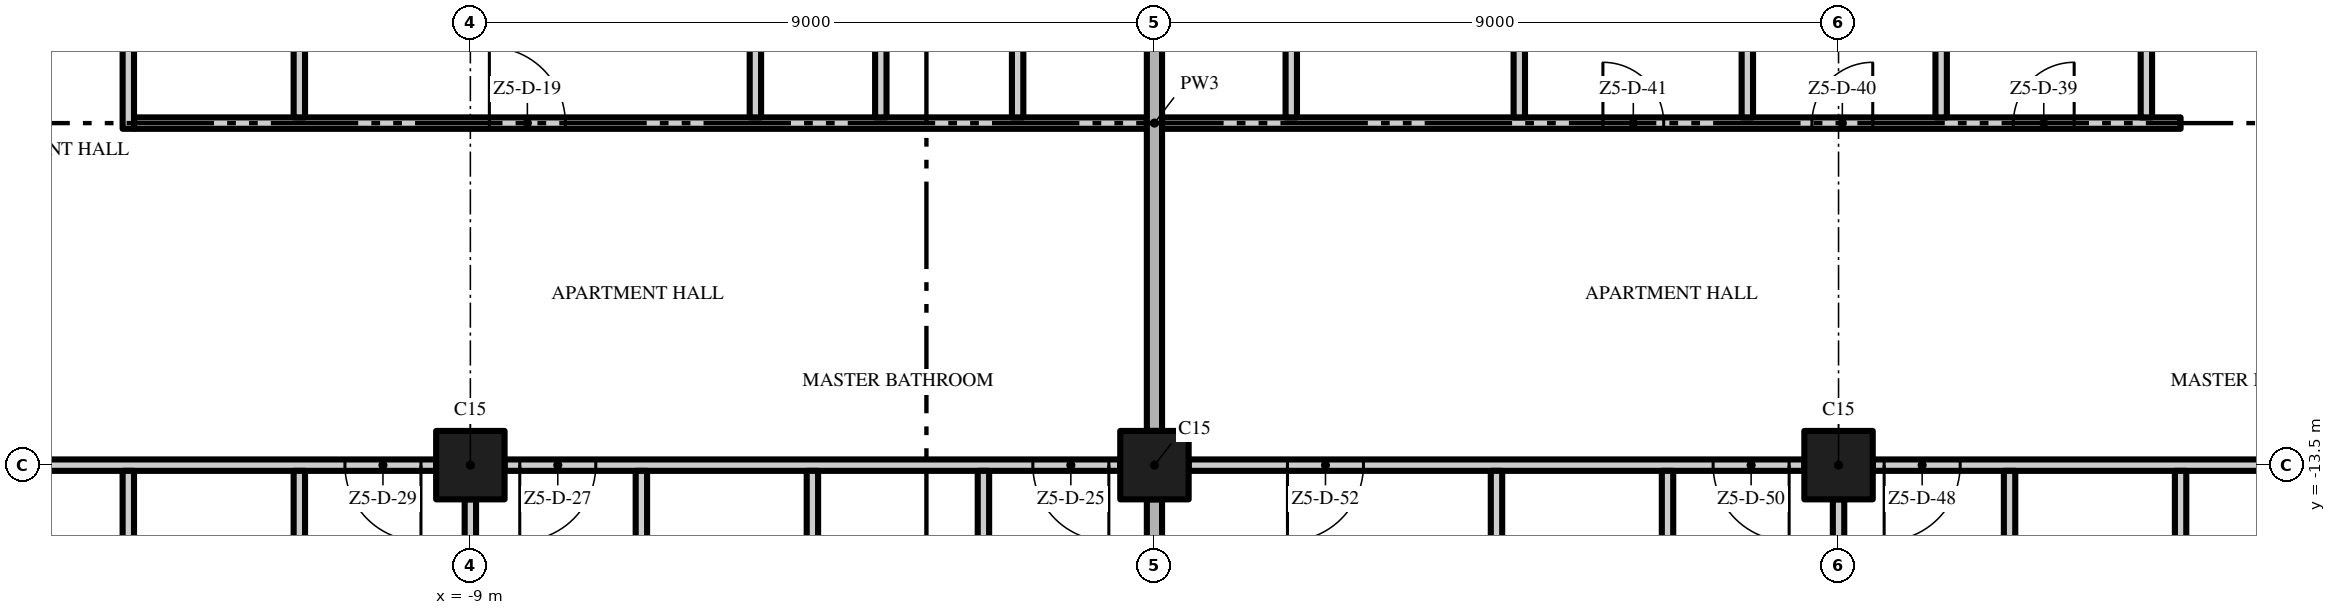
"""IFC4 building model, lengths in metres.
Left out: names, types, materials, properties, quantities, classifications, styles, units other than length and angle.
Written with IfcOpenShell. Run it as: python <this file> out.ifc"""

import sys

from ifc_helpers import new_model, si_unit, direction, frame, frame_2d, origin, origin_2d, place, context, subcontext, project, spatial, rectangle, extrude, element, fill, save


model = new_model("IFC4")
c1 = context("Model", 3, precision=1e-05, world=origin(), true_north=direction((0.0, 1.0)))
c2 = subcontext(c1, "Body", "Model", "MODEL_VIEW")
j1 = project(units=[si_unit("LENGTHUNIT", "METRE"), si_unit("PLANEANGLEUNIT", "RADIAN")], contexts=[c1])
p1 = place(None, origin())
s1 = spatial("IfcSite", under=j1, at=p1, CompositionType="ELEMENT")
p2 = place(p1, origin())
s2 = spatial("IfcBuilding", under=s1, at=p2, CompositionType="ELEMENT")
p3 = place(p2, frame((0.0, 0.0, 276.8)))
s3 = spatial("IfcBuildingStorey", under=s2, at=p3, CompositionType="ELEMENT", Elevation=276.8)
for number, where, z_axis, x_axis in (
    (1, (-9.0, -13.5, 0.0), (0.0, 0.0, 1.0), (1.0, 0.0, 0.0)),
    (2, (0.0, -13.5, 0.0), (0.0, 0.0, 1.0), (1.0, 0.0, 0.0)),
    (3, (9.0, -13.5, 0.0), (0.0, 0.0, 1.0), (1.0, 0.0, 0.0)),
):
    element("IfcColumn", number, at=place(p3, frame(where, z_axis=z_axis, x_axis=x_axis)), inside=s3, PredefinedType="COLUMN", context=c2, shape_type="SweptSolid", body=[
        extrude(rectangle(XDim=0.9, YDim=0.9, at=origin_2d()), origin(), (0.0, 0.0, 1.0), 3.5),
    ])
p4 = place(p3, frame((-9.45, -13.5, 0.0), z_axis=(0.0, 0.0, 1.0), x_axis=(-1.0, 0.0, 0.0)))
e4 = element("IfcWall", 4, at=p4, inside=s3, PredefinedType="PARTITIONING", context=c2, shape_type="SweptSolid", body=[
    extrude(rectangle(XDim=8.1, YDim=0.15, at=frame_2d((4.05, 0.0))), origin(), (0.0, 0.0, 1.0), 3.5),
])
p5 = place(p4, frame((0.2, 0.0, 0.0)))
e5 = element("IfcOpeningElement", 5, at=p5, cuts=e4, PredefinedType="OPENING", context=c2, shape_type="SweptSolid", body=[
    extrude(rectangle(XDim=1.0, YDim=2.4, at=frame_2d((0.5, 1.2))), frame((0.0, 0.085, 0.0), z_axis=(0.0, -1.0, 0.0), x_axis=(1.0, 0.0, 0.0)), (0.0, 0.0, 1.0), 0.17),
])
p6 = place(p4, frame((5.8, 0.0, 0.0)))
e6 = element("IfcOpeningElement", 6, at=p6, cuts=e4, PredefinedType="OPENING", context=c2, shape_type="SweptSolid", body=[
    extrude(rectangle(XDim=1.0, YDim=2.4, at=frame_2d((0.5, 1.2))), frame((0.0, 0.085, 0.0), z_axis=(0.0, -1.0, 0.0), x_axis=(1.0, 0.0, 0.0)), (0.0, 0.0, 1.0), 0.17),
])
p7 = place(p3, frame((-0.45, -13.5, 0.0), z_axis=(0.0, 0.0, 1.0), x_axis=(-1.0, 0.0, 0.0)))
e7 = element("IfcWall", 7, at=p7, inside=s3, PredefinedType="PARTITIONING", context=c2, shape_type="SweptSolid", body=[
    extrude(rectangle(XDim=8.1, YDim=0.15, at=frame_2d((4.05, 0.0))), origin(), (0.0, 0.0, 1.0), 3.5),
])
p8 = place(p7, frame((0.15, 0.0, 0.0)))
e8 = element("IfcOpeningElement", 8, at=p8, cuts=e7, PredefinedType="OPENING", context=c2, shape_type="SweptSolid", body=[
    extrude(rectangle(XDim=1.0, YDim=2.4, at=frame_2d((0.5, 1.2))), frame((0.0, 0.085, 0.0), z_axis=(0.0, -1.0, 0.0), x_axis=(1.0, 0.0, 0.0)), (0.0, 0.0, 1.0), 0.17),
])
p9 = place(p7, frame((6.9, 0.0, 0.0)))
e9 = element("IfcOpeningElement", 9, at=p9, cuts=e7, PredefinedType="OPENING", context=c2, shape_type="SweptSolid", body=[
    extrude(rectangle(XDim=1.0, YDim=2.4, at=frame_2d((0.5, 1.2))), frame((0.0, 0.085, 0.0), z_axis=(0.0, -1.0, 0.0), x_axis=(1.0, 0.0, 0.0)), (0.0, 0.0, 1.0), 0.17),
])
p10 = place(p3, frame((8.55, -13.5, 0.0), z_axis=(0.0, 0.0, 1.0), x_axis=(-1.0, 0.0, 0.0)))
e10 = element("IfcWall", 10, at=p10, inside=s3, PredefinedType="PARTITIONING", context=c2, shape_type="SweptSolid", body=[
    extrude(rectangle(XDim=8.1, YDim=0.15, at=frame_2d((4.05, 0.0))), origin(), (0.0, 0.0, 1.0), 3.5),
])
p11 = place(p10, frame((0.2, 0.0, 0.0)))
e11 = element("IfcOpeningElement", 11, at=p11, cuts=e10, PredefinedType="OPENING", context=c2, shape_type="SweptSolid", body=[
    extrude(rectangle(XDim=1.0, YDim=2.4, at=frame_2d((0.5, 1.2))), frame((0.0, 0.085, 0.0), z_axis=(0.0, -1.0, 0.0), x_axis=(1.0, 0.0, 0.0)), (0.0, 0.0, 1.0), 0.17),
])
p12 = place(p10, frame((5.8, 0.0, 0.0)))
e12 = element("IfcOpeningElement", 12, at=p12, cuts=e10, PredefinedType="OPENING", context=c2, shape_type="SweptSolid", body=[
    extrude(rectangle(XDim=1.0, YDim=2.4, at=frame_2d((0.5, 1.2))), frame((0.0, 0.085, 0.0), z_axis=(0.0, -1.0, 0.0), x_axis=(1.0, 0.0, 0.0)), (0.0, 0.0, 1.0), 0.17),
])
p13 = place(p3, frame((17.55, -13.5, 0.0), z_axis=(0.0, 0.0, 1.0), x_axis=(-1.0, 0.0, 0.0)))
e13 = element("IfcWall", 13, at=p13, inside=s3, PredefinedType="PARTITIONING", context=c2, shape_type="SweptSolid", body=[
    extrude(rectangle(XDim=8.1, YDim=0.15, at=frame_2d((4.05, 0.0))), origin(), (0.0, 0.0, 1.0), 3.5),
])
p14 = place(p13, frame((0.15, 0.0, 0.0)))
e14 = element("IfcOpeningElement", 14, at=p14, cuts=e13, PredefinedType="OPENING", context=c2, shape_type="SweptSolid", body=[
    extrude(rectangle(XDim=1.0, YDim=2.4, at=frame_2d((0.5, 1.2))), frame((0.0, 0.085, 0.0), z_axis=(0.0, -1.0, 0.0), x_axis=(1.0, 0.0, 0.0)), (0.0, 0.0, 1.0), 0.17),
])
p15 = place(p13, frame((6.95, 0.0, 0.0)))
e15 = element("IfcOpeningElement", 15, at=p15, cuts=e13, PredefinedType="OPENING", context=c2, shape_type="SweptSolid", body=[
    extrude(rectangle(XDim=1.0, YDim=2.4, at=frame_2d((0.5, 1.2))), frame((0.0, 0.085, 0.0), z_axis=(0.0, -1.0, 0.0), x_axis=(1.0, 0.0, 0.0)), (0.0, 0.0, 1.0), 0.17),
])
p16 = place(p3, frame((-13.425, -9.0, 0.0), z_axis=(0.0, 0.0, 1.0), x_axis=(1.0, 0.0, 0.0)))
e16 = element("IfcWall", 16, at=p16, inside=s3, PredefinedType="PARTITIONING", context=c2, shape_type="SweptSolid", body=[
    extrude(rectangle(XDim=13.325, YDim=0.15, at=frame_2d((6.662, 0.0))), origin(), (0.0, 0.0, 1.0), 3.5),
])
p17 = place(p16, frame((4.675, 0.0, 0.0)))
e17 = element("IfcOpeningElement", 17, at=p17, cuts=e16, PredefinedType="OPENING", context=c2, shape_type="SweptSolid", body=[
    extrude(rectangle(XDim=1.0, YDim=2.4, at=frame_2d((0.5, 1.2))), frame((0.0, 0.085, 0.0), z_axis=(0.0, -1.0, 0.0), x_axis=(1.0, 0.0, 0.0)), (0.0, 0.0, 1.0), 0.17),
])
p18 = place(p3, frame((0.1, -9.0, 0.0), z_axis=(0.0, 0.0, 1.0), x_axis=(1.0, 0.0, 0.0)))
e18 = element("IfcWall", 18, at=p18, inside=s3, PredefinedType="PARTITIONING", context=c2, shape_type="SweptSolid", body=[
    extrude(rectangle(XDim=13.4, YDim=0.15, at=frame_2d((6.7, 0.0))), origin(), (0.0, 0.0, 1.0), 3.5),
])
p19 = place(p18, frame((11.2, 0.0, 0.0)))
e19 = element("IfcOpeningElement", 19, at=p19, cuts=e18, PredefinedType="OPENING", context=c2, shape_type="SweptSolid", body=[
    extrude(rectangle(XDim=0.8, YDim=2.0, at=frame_2d((0.4, 1.0))), frame((0.0, 0.085, 0.0), z_axis=(0.0, -1.0, 0.0), x_axis=(1.0, 0.0, 0.0)), (0.0, 0.0, 1.0), 0.17),
])
p20 = place(p18, frame((8.55, 0.0, 0.0)))
e20 = element("IfcOpeningElement", 20, at=p20, cuts=e18, PredefinedType="OPENING", context=c2, shape_type="SweptSolid", body=[
    extrude(rectangle(XDim=0.8, YDim=2.0, at=frame_2d((0.4, 1.0))), frame((0.0, 0.085, 0.0), z_axis=(0.0, -1.0, 0.0), x_axis=(1.0, 0.0, 0.0)), (0.0, 0.0, 1.0), 0.17),
])
p21 = place(p18, frame((5.8, 0.0, 0.0)))
e21 = element("IfcOpeningElement", 21, at=p21, cuts=e18, PredefinedType="OPENING", context=c2, shape_type="SweptSolid", body=[
    extrude(rectangle(XDim=0.8, YDim=2.0, at=frame_2d((0.4, 1.0))), frame((0.0, 0.085, 0.0), z_axis=(0.0, -1.0, 0.0), x_axis=(1.0, 0.0, 0.0)), (0.0, 0.0, 1.0), 0.17),
])
p22 = place(p3, frame((-13.5, -22.2, 0.0), z_axis=(0.0, 0.0, 1.0), x_axis=(0.0, 1.0, 0.0)))
e22 = element("IfcWall", 22, at=p22, inside=s3, PredefinedType="PARTITIONING", context=c2, shape_type="SweptSolid", body=[
    extrude(rectangle(XDim=8.625, YDim=0.15, at=frame_2d((4.312, 0.0))), origin(), (0.0, 0.0, 1.0), 3.5),
])
p23 = place(p3, frame((-13.5, -4.425, 0.0), z_axis=(0.0, 0.0, 1.0), x_axis=(0.0, -1.0, 0.0)))
e23 = element("IfcWall", 23, at=p23, inside=s3, PredefinedType="PARTITIONING", context=c2, shape_type="SweptSolid", body=[
    extrude(rectangle(XDim=4.65, YDim=0.15, at=frame_2d((2.325, 0.0))), origin(), (0.0, 0.0, 1.0), 3.5),
])
p24 = place(p23, frame((1.875, 0.0, 0.0)))
e24 = element("IfcOpeningElement", 24, at=p24, cuts=e23, PredefinedType="OPENING", context=c2, shape_type="SweptSolid", body=[
    extrude(rectangle(XDim=0.9, YDim=2.1, at=frame_2d((0.45, 1.05))), frame((0.0, 0.085, 0.0), z_axis=(0.0, -1.0, 0.0), x_axis=(1.0, 0.0, 0.0)), (0.0, 0.0, 1.0), 0.17),
])
p25 = place(p3, frame((-11.25, -16.575, 0.0), z_axis=(0.0, 0.0, 1.0), x_axis=(0.0, 1.0, 0.0)))
e25 = element("IfcWall", 25, at=p25, inside=s3, PredefinedType="PARTITIONING", context=c2, shape_type="SweptSolid", body=[
    extrude(rectangle(XDim=3.0, YDim=0.15, at=frame_2d((1.5, 0.0))), origin(), (0.0, 0.0, 1.0), 3.5),
])
p26 = place(p3, frame((-11.25, -8.925, 0.0), z_axis=(0.0, 0.0, 1.0), x_axis=(0.0, 1.0, 0.0)))
e26 = element("IfcWall", 26, at=p26, inside=s3, PredefinedType="PARTITIONING", context=c2, shape_type="SweptSolid", body=[
    extrude(rectangle(XDim=4.35, YDim=0.15, at=frame_2d((2.175, 0.0))), origin(), (0.0, 0.0, 1.0), 3.5),
])
p27 = place(p3, frame((-9.0, -21.6, 0.0), z_axis=(0.0, 0.0, 1.0), x_axis=(0.0, 1.0, 0.0)))
e27 = element("IfcWall", 27, at=p27, inside=s3, PredefinedType="PARTITIONING", context=c2, shape_type="SweptSolid", body=[
    extrude(rectangle(XDim=7.65, YDim=0.15, at=frame_2d((3.825, 0.0))), origin(), (0.0, 0.0, 1.0), 3.5),
])
p28 = place(p3, frame((-6.75, -16.575, 0.0), z_axis=(0.0, 0.0, 1.0), x_axis=(0.0, 1.0, 0.0)))
e28 = element("IfcWall", 28, at=p28, inside=s3, PredefinedType="PARTITIONING", context=c2, shape_type="SweptSolid", body=[
    extrude(rectangle(XDim=3.0, YDim=0.15, at=frame_2d((1.5, 0.0))), origin(), (0.0, 0.0, 1.0), 3.5),
])
p29 = place(p3, frame((-5.25, -8.925, 0.0), z_axis=(0.0, 0.0, 1.0), x_axis=(0.0, 1.0, 0.0)))
e29 = element("IfcWall", 29, at=p29, inside=s3, PredefinedType="PARTITIONING", context=c2, shape_type="SweptSolid", body=[
    extrude(rectangle(XDim=4.35, YDim=0.15, at=frame_2d((2.175, 0.0))), origin(), (0.0, 0.0, 1.0), 3.5),
])
p30 = place(p3, frame((-4.5, -22.2, 0.0), z_axis=(0.0, 0.0, 1.0), x_axis=(0.0, 1.0, 0.0)))
e30 = element("IfcWall", 30, at=p30, inside=s3, PredefinedType="PARTITIONING", context=c2, shape_type="SweptSolid", body=[
    extrude(rectangle(XDim=8.625, YDim=0.15, at=frame_2d((4.312, 0.0))), origin(), (0.0, 0.0, 1.0), 3.5),
])
p31 = place(p3, frame((-3.6, -8.925, 0.0), z_axis=(0.0, 0.0, 1.0), x_axis=(0.0, 1.0, 0.0)))
e31 = element("IfcWall", 31, at=p31, inside=s3, PredefinedType="PARTITIONING", context=c2, shape_type="SweptSolid", body=[
    extrude(rectangle(XDim=4.35, YDim=0.15, at=frame_2d((2.175, 0.0))), origin(), (0.0, 0.0, 1.0), 3.5),
])
p32 = place(p3, frame((-2.25, -16.575, 0.0), z_axis=(0.0, 0.0, 1.0), x_axis=(0.0, 1.0, 0.0)))
e32 = element("IfcWall", 32, at=p32, inside=s3, PredefinedType="PARTITIONING", context=c2, shape_type="SweptSolid", body=[
    extrude(rectangle(XDim=3.0, YDim=0.15, at=frame_2d((1.5, 0.0))), origin(), (0.0, 0.0, 1.0), 3.5),
])
p33 = place(p3, frame((-1.8, -8.925, 0.0), z_axis=(0.0, 0.0, 1.0), x_axis=(0.0, 1.0, 0.0)))
e33 = element("IfcWall", 33, at=p33, inside=s3, PredefinedType="PARTITIONING", context=c2, shape_type="SweptSolid", body=[
    extrude(rectangle(XDim=4.35, YDim=0.15, at=frame_2d((2.175, 0.0))), origin(), (0.0, 0.0, 1.0), 3.5),
])
p34 = place(p3, frame((0.0, -21.6, 0.0), z_axis=(0.0, 0.0, 1.0), x_axis=(0.0, 1.0, 0.0)))
e34 = element("IfcWall", 34, at=p34, inside=s3, PredefinedType="PARTITIONING", context=c2, shape_type="SweptSolid", body=[
    extrude(rectangle(XDim=7.65, YDim=0.2, at=frame_2d((3.825, 0.0))), origin(), (0.0, 0.0, 1.0), 3.5),
])
p35 = place(p3, frame((0.0, -13.05, 0.0), z_axis=(0.0, 0.0, 1.0), x_axis=(0.0, 1.0, 0.0)))
e35 = element("IfcWall", 35, at=p35, inside=s3, PredefinedType="PARTITIONING", context=c2, shape_type="SweptSolid", body=[
    extrude(rectangle(XDim=8.1, YDim=0.2, at=frame_2d((4.05, 0.0))), origin(), (0.0, 0.0, 1.0), 3.5),
])
p36 = place(p3, frame((1.8, -8.925, 0.0), z_axis=(0.0, 0.0, 1.0), x_axis=(0.0, 1.0, 0.0)))
e36 = element("IfcWall", 36, at=p36, inside=s3, PredefinedType="PARTITIONING", context=c2, shape_type="SweptSolid", body=[
    extrude(rectangle(XDim=4.35, YDim=0.15, at=frame_2d((2.175, 0.0))), origin(), (0.0, 0.0, 1.0), 3.5),
])
p37 = place(p3, frame((4.5, -22.2, 0.0), z_axis=(0.0, 0.0, 1.0), x_axis=(0.0, 1.0, 0.0)))
e37 = element("IfcWall", 37, at=p37, inside=s3, PredefinedType="PARTITIONING", context=c2, shape_type="SweptSolid", body=[
    extrude(rectangle(XDim=8.625, YDim=0.15, at=frame_2d((4.312, 0.0))), origin(), (0.0, 0.0, 1.0), 3.5),
])
p38 = place(p3, frame((4.8, -8.925, 0.0), z_axis=(0.0, 0.0, 1.0), x_axis=(0.0, 1.0, 0.0)))
e38 = element("IfcWall", 38, at=p38, inside=s3, PredefinedType="PARTITIONING", context=c2, shape_type="SweptSolid", body=[
    extrude(rectangle(XDim=4.35, YDim=0.15, at=frame_2d((2.175, 0.0))), origin(), (0.0, 0.0, 1.0), 3.5),
])
p39 = place(p3, frame((6.75, -16.575, 0.0), z_axis=(0.0, 0.0, 1.0), x_axis=(0.0, 1.0, 0.0)))
e39 = element("IfcWall", 39, at=p39, inside=s3, PredefinedType="PARTITIONING", context=c2, shape_type="SweptSolid", body=[
    extrude(rectangle(XDim=3.0, YDim=0.15, at=frame_2d((1.5, 0.0))), origin(), (0.0, 0.0, 1.0), 3.5),
])
p40 = place(p3, frame((7.8, -8.925, 0.0), z_axis=(0.0, 0.0, 1.0), x_axis=(0.0, 1.0, 0.0)))
e40 = element("IfcWall", 40, at=p40, inside=s3, PredefinedType="PARTITIONING", context=c2, shape_type="SweptSolid", body=[
    extrude(rectangle(XDim=4.35, YDim=0.15, at=frame_2d((2.175, 0.0))), origin(), (0.0, 0.0, 1.0), 3.5),
])
p41 = place(p3, frame((9.0, -21.6, 0.0), z_axis=(0.0, 0.0, 1.0), x_axis=(0.0, 1.0, 0.0)))
e41 = element("IfcWall", 41, at=p41, inside=s3, PredefinedType="PARTITIONING", context=c2, shape_type="SweptSolid", body=[
    extrude(rectangle(XDim=7.65, YDim=0.15, at=frame_2d((3.825, 0.0))), origin(), (0.0, 0.0, 1.0), 3.5),
])
p42 = place(p3, frame((10.35, -8.925, 0.0), z_axis=(0.0, 0.0, 1.0), x_axis=(0.0, 1.0, 0.0)))
e42 = element("IfcWall", 42, at=p42, inside=s3, PredefinedType="PARTITIONING", context=c2, shape_type="SweptSolid", body=[
    extrude(rectangle(XDim=4.35, YDim=0.15, at=frame_2d((2.175, 0.0))), origin(), (0.0, 0.0, 1.0), 3.5),
])
p43 = place(p3, frame((11.25, -16.575, 0.0), z_axis=(0.0, 0.0, 1.0), x_axis=(0.0, 1.0, 0.0)))
e43 = element("IfcWall", 43, at=p43, inside=s3, PredefinedType="PARTITIONING", context=c2, shape_type="SweptSolid", body=[
    extrude(rectangle(XDim=3.0, YDim=0.15, at=frame_2d((1.5, 0.0))), origin(), (0.0, 0.0, 1.0), 3.5),
])
p44 = place(p3, frame((13.05, -8.925, 0.0), z_axis=(0.0, 0.0, 1.0), x_axis=(0.0, 1.0, 0.0)))
e44 = element("IfcWall", 44, at=p44, inside=s3, PredefinedType="PARTITIONING", context=c2, shape_type="SweptSolid", body=[
    extrude(rectangle(XDim=4.5, YDim=0.15, at=frame_2d((2.25, 0.0))), origin(), (0.0, 0.0, 1.0), 3.5),
])
p45 = place(p3, frame((13.5, -22.2, 0.0), z_axis=(0.0, 0.0, 1.0), x_axis=(0.0, 1.0, 0.0)))
e45 = element("IfcWall", 45, at=p45, inside=s3, PredefinedType="PARTITIONING", context=c2, shape_type="SweptSolid", body=[
    extrude(rectangle(XDim=8.625, YDim=0.15, at=frame_2d((4.312, 0.0))), origin(), (0.0, 0.0, 1.0), 3.5),
])
p46 = place(p17, origin())
e46 = element("IfcDoor", 46, at=p46, inside=s3, OperationType="SINGLE_SWING_LEFT", PredefinedType="DOOR", context=c2, shape_type="SweptSolid", body=[
    extrude(rectangle(XDim=1.0, YDim=2.4, at=frame_2d((0.5, 1.2))), frame((0.0, 0.025, 0.0), z_axis=(0.0, -1.0, 0.0), x_axis=(1.0, 0.0, 0.0)), (0.0, 0.0, 1.0), 0.05),
])
fill(e17, e46)
p47 = place(p8, origin())
e47 = element("IfcDoor", 47, at=p47, inside=s3, OperationType="SINGLE_SWING_LEFT", PredefinedType="DOOR", context=c2, shape_type="SweptSolid", body=[
    extrude(rectangle(XDim=1.0, YDim=2.4, at=frame_2d((0.5, 1.2))), frame((0.0, 0.025, 0.0), z_axis=(0.0, -1.0, 0.0), x_axis=(1.0, 0.0, 0.0)), (0.0, 0.0, 1.0), 0.05),
])
fill(e8, e47)
p48 = place(p9, origin())
e48 = element("IfcDoor", 48, at=p48, inside=s3, OperationType="SINGLE_SWING_RIGHT", PredefinedType="DOOR", context=c2, shape_type="SweptSolid", body=[
    extrude(rectangle(XDim=1.0, YDim=2.4, at=frame_2d((0.5, 1.2))), frame((0.0, 0.025, 0.0), z_axis=(0.0, -1.0, 0.0), x_axis=(1.0, 0.0, 0.0)), (0.0, 0.0, 1.0), 0.05),
])
fill(e9, e48)
p49 = place(p5, origin())
e49 = element("IfcDoor", 49, at=p49, inside=s3, OperationType="SINGLE_SWING_LEFT", PredefinedType="DOOR", context=c2, shape_type="SweptSolid", body=[
    extrude(rectangle(XDim=1.0, YDim=2.4, at=frame_2d((0.5, 1.2))), frame((0.0, 0.025, 0.0), z_axis=(0.0, -1.0, 0.0), x_axis=(1.0, 0.0, 0.0)), (0.0, 0.0, 1.0), 0.05),
])
fill(e5, e49)
p50 = place(p19, origin())
e50 = element("IfcDoor", 50, at=p50, inside=s3, OperationType="SINGLE_SWING_RIGHT", PredefinedType="DOOR", context=c2, shape_type="SweptSolid", body=[
    extrude(rectangle(XDim=0.8, YDim=2.0, at=frame_2d((0.4, 1.0))), frame((0.0, 0.025, 0.0), z_axis=(0.0, -1.0, 0.0), x_axis=(1.0, 0.0, 0.0)), (0.0, 0.0, 1.0), 0.05),
])
fill(e19, e50)
p51 = place(p20, origin())
e51 = element("IfcDoor", 51, at=p51, inside=s3, OperationType="SINGLE_SWING_RIGHT", PredefinedType="DOOR", context=c2, shape_type="SweptSolid", body=[
    extrude(rectangle(XDim=0.8, YDim=2.0, at=frame_2d((0.4, 1.0))), frame((0.0, 0.025, 0.0), z_axis=(0.0, -1.0, 0.0), x_axis=(1.0, 0.0, 0.0)), (0.0, 0.0, 1.0), 0.05),
])
fill(e20, e51)
p52 = place(p21, origin())
e52 = element("IfcDoor", 52, at=p52, inside=s3, OperationType="SINGLE_SWING_LEFT", PredefinedType="DOOR", context=c2, shape_type="SweptSolid", body=[
    extrude(rectangle(XDim=0.8, YDim=2.0, at=frame_2d((0.4, 1.0))), frame((0.0, 0.025, 0.0), z_axis=(0.0, -1.0, 0.0), x_axis=(1.0, 0.0, 0.0)), (0.0, 0.0, 1.0), 0.05),
])
fill(e21, e52)
p53 = place(p15, origin())
e53 = element("IfcDoor", 53, at=p53, inside=s3, OperationType="SINGLE_SWING_RIGHT", PredefinedType="DOOR", context=c2, shape_type="SweptSolid", body=[
    extrude(rectangle(XDim=1.0, YDim=2.4, at=frame_2d((0.5, 1.2))), frame((0.0, 0.025, 0.0), z_axis=(0.0, -1.0, 0.0), x_axis=(1.0, 0.0, 0.0)), (0.0, 0.0, 1.0), 0.05),
])
fill(e15, e53)
p54 = place(p11, origin())
e54 = element("IfcDoor", 54, at=p54, inside=s3, OperationType="SINGLE_SWING_LEFT", PredefinedType="DOOR", context=c2, shape_type="SweptSolid", body=[
    extrude(rectangle(XDim=1.0, YDim=2.4, at=frame_2d((0.5, 1.2))), frame((0.0, 0.025, 0.0), z_axis=(0.0, -1.0, 0.0), x_axis=(1.0, 0.0, 0.0)), (0.0, 0.0, 1.0), 0.05),
])
fill(e11, e54)
p55 = place(p12, origin())
e55 = element("IfcDoor", 55, at=p55, inside=s3, OperationType="SINGLE_SWING_RIGHT", PredefinedType="DOOR", context=c2, shape_type="SweptSolid", body=[
    extrude(rectangle(XDim=1.0, YDim=2.4, at=frame_2d((0.5, 1.2))), frame((0.0, 0.025, 0.0), z_axis=(0.0, -1.0, 0.0), x_axis=(1.0, 0.0, 0.0)), (0.0, 0.0, 1.0), 0.05),
])
fill(e12, e55)
save(model, sys.argv[1])
